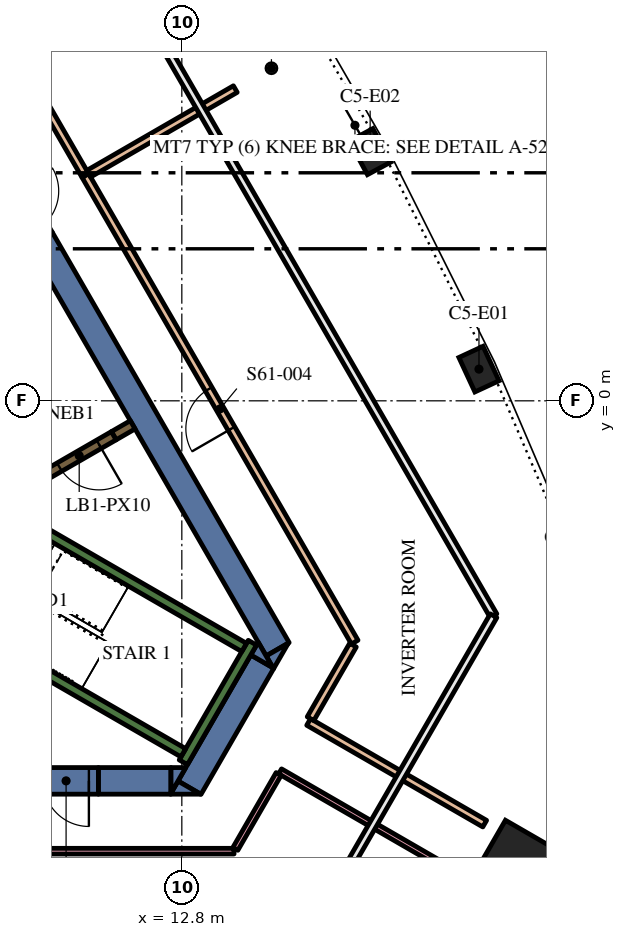
"""IFC4 building model, lengths in metres.
Left out: names, types, materials, properties, quantities, classifications, styles, units other than length and angle.
Written with IfcOpenShell. Run it as: python <this file> out.ifc"""

import sys

from ifc_helpers import new_model, si_unit, direction, frame, frame_2d, origin, origin_2d, place, context, subcontext, project, spatial, polyline, rectangle, outline, extrude, element, fill, save


model = new_model("IFC4")
c1 = context("Model", 3, precision=1e-05, world=origin(), true_north=direction((0.0, 1.0)))
c2 = subcontext(c1, "Body", "Model", "MODEL_VIEW")
j1 = project(units=[si_unit("LENGTHUNIT", "METRE"), si_unit("PLANEANGLEUNIT", "RADIAN")], contexts=[c1])
p1 = place(None, origin())
s1 = spatial("IfcSite", under=j1, at=p1, CompositionType="ELEMENT")
p2 = place(p1, origin())
s2 = spatial("IfcBuilding", under=s1, at=p2, CompositionType="ELEMENT")
p3 = place(p2, frame((0.0, 0.0, 261.6)))
s3 = spatial("IfcBuildingStorey", under=s2, at=p3, CompositionType="ELEMENT", Elevation=261.6)
p4 = place(p3, frame((21.718, -12.539, 0.0), z_axis=(0.0, 0.0, 1.0), x_axis=(0.866025403784, -0.5, 0.0)))
e1 = element("IfcColumn", 1, at=p4, inside=s3, PredefinedType="COLUMN", context=c2, shape_type="SweptSolid", body=[
    extrude(rectangle(XDim=2.2, YDim=2.2, at=origin_2d()), origin(), (0.0, 0.0, 1.0), 5.4),
])
for number, where, z_axis, x_axis in (
    (2, (20.619, 0.834, 0.0), (0.0, 0.0, 1.0), (-0.421, 0.907, 0.0)),
    (3, (17.756, 6.557, 0.0), (0.0, 0.0, 1.0), (-0.474, 0.881, 0.0)),
):
    element("IfcColumn", number, at=place(p3, frame(where, z_axis=z_axis, x_axis=x_axis)), inside=s3, PredefinedType="COLUMN", context=c2, shape_type="SweptSolid", body=[
        extrude(rectangle(XDim=1.0, YDim=0.7, at=origin_2d()), origin(), (0.0, 0.0, 1.0), 5.4),
    ])
p5 = place(p3, frame((9.085, 4.264, 0.0), z_axis=(0.0, 0.0, 1.0), x_axis=(0.499998082512, -0.866026510844, 0.0)))
e4 = element("IfcWall", 4, at=p5, inside=s3, PredefinedType="SOLIDWALL", context=c2, shape_type="SweptSolid", body=[
    extrude(rectangle(XDim=12.472, YDim=0.7, at=frame_2d((6.236, 0.0))), origin(), (0.0, 0.0, 1.0), 5.4),
])
p6 = place(p3, origin())
e5 = element("IfcWall", 5, at=p6, inside=s3, PredefinedType="SOLIDWALL", context=c2, shape_type="SweptSolid", body=[
    extrude(outline(polyline([(15.213, -7.05), (15.019, -6.714), (15.601, -6.378), (15.213, -7.05)])), origin(), (0.0, 0.0, 1.0), 5.4),
])
p7 = place(p3, frame((13.003, -10.179, 0.0), z_axis=(0.0, 0.0, 1.0), x_axis=(0.499972675833, 0.866041178825, 0.0)))
e6 = element("IfcWall", 6, at=p7, inside=s3, PredefinedType="SOLIDWALL", context=c2, shape_type="SweptSolid", body=[
    extrude(rectangle(XDim=3.829, YDim=0.7, at=frame_2d((1.915, 0.0))), origin(), (0.0, 0.0, 1.0), 5.4),
])
e7 = element("IfcWall", 7, at=p6, inside=s3, PredefinedType="SOLIDWALL", context=c2, shape_type="SweptSolid", body=[
    extrude(outline(polyline([(12.698, -10.005), (13.296, -10.35), (12.5, -10.35), (12.698, -10.005)])), origin(), (0.0, 0.0, 1.0), 5.4),
])
e8 = element("IfcWall", 8, at=p6, inside=s3, PredefinedType="SOLIDWALL", context=c2, shape_type="SweptSolid", body=[
    extrude(outline(polyline([(14.809, -6.35), (15.197, -7.022), (14.615, -6.686), (14.809, -6.35)])), origin(), (0.0, 0.0, 1.0), 5.4),
])
p8 = place(p3, frame((10.604, -10.0, 0.0), z_axis=(0.0, 0.0, 1.0), x_axis=(1.0, 0.0, 0.0)))
e9 = element("IfcWall", 9, at=p8, inside=s3, PredefinedType="SOLIDWALL", context=c2, shape_type="SweptSolid", body=[
    extrude(rectangle(XDim=1.909, YDim=0.7, at=frame_2d((0.955, 0.0))), origin(), (0.0, 0.0, 1.0), 5.4),
])
e10 = element("IfcWall", 10, at=p6, inside=s3, PredefinedType="SOLIDWALL", context=c2, shape_type="SweptSolid", body=[
    extrude(outline(polyline([(12.904, -9.65), (12.516, -10.322), (12.516, -9.65), (12.904, -9.65)])), origin(), (0.0, 0.0, 1.0), 5.4),
])
p9 = place(p3, frame((12.84, -9.511, 0.0), z_axis=(0.0, 0.0, 1.0), x_axis=(0.500048121057, 0.865997619297, 0.0)))
e11 = element("IfcWall", 11, at=p9, inside=s3, PredefinedType="SOLIDWALL", context=c2, shape_type="SweptSolid", body=[
    extrude(rectangle(XDim=3.634, YDim=0.25, at=frame_2d((1.817, 0.0))), origin(), (0.0, 0.0, 1.0), 5.4),
])
p10 = place(p3, frame((12.84, -9.261, 0.0), z_axis=(0.0, 0.0, 1.0), x_axis=(-0.866013990052, 0.500019768644, 0.0)))
e12 = element("IfcWall", 12, at=p10, inside=s3, PredefinedType="SOLIDWALL", context=c2, shape_type="SweptSolid", body=[
    extrude(rectangle(XDim=6.8, YDim=0.25, at=frame_2d((3.4, 0.0))), origin(), (0.0, 0.0, 1.0), 5.4),
])
p11 = place(p3, frame((8.334, -2.964, 0.0), z_axis=(0.0, 0.0, 1.0), x_axis=(0.866016039709, -0.500016218704, 0.0)))
e13 = element("IfcWall", 13, at=p11, inside=s3, PredefinedType="SOLIDWALL", context=c2, shape_type="SweptSolid", body=[
    extrude(rectangle(XDim=7.05, YDim=0.25, at=frame_2d((3.525, 0.0))), origin(), (0.0, 0.0, 1.0), 5.4),
])
p12 = place(p3, frame((11.507, -0.631, 0.0), z_axis=(0.0, 0.0, 1.0), x_axis=(-0.866093731455, -0.499881634324, 0.0)))
e14 = element("IfcWall", 14, at=p12, inside=s3, PredefinedType="SOLIDWALL", context=c2, shape_type="SweptSolid", body=[
    extrude(rectangle(XDim=0.575, YDim=0.25, at=frame_2d((0.288, 0.0))), origin(), (0.0, 0.0, 1.0), 5.4),
])
p13 = place(p3, frame((11.009, -0.919, 0.0), z_axis=(0.0, 0.0, 1.0), x_axis=(-0.866059744384, -0.49994051562, 0.0)))
e15 = element("IfcWall", 15, at=p13, inside=s3, PredefinedType="SOLIDWALL", context=c2, shape_type="SweptSolid", body=[
    extrude(rectangle(XDim=2.1, YDim=0.25, at=frame_2d((1.05, 0.0))), origin(), (0.0, 0.0, 1.0), 5.4),
])
p14 = place(p13, frame((0.45, 0.0, 0.0)))
e16 = element("IfcOpeningElement", 16, at=p14, cuts=e15, PredefinedType="OPENING", context=c2, shape_type="SweptSolid", body=[
    extrude(rectangle(XDim=1.2, YDim=2.1, at=frame_2d((0.6, 1.05))), frame((0.0, 0.135, 0.0), z_axis=(0.0, -1.0, 0.0), x_axis=(1.0, 0.0, 0.0)), (0.0, 0.0, 1.0), 0.27),
])
p15 = place(p3, frame((10.604, -10.0, 0.0), z_axis=(0.0, 0.0, 1.0), x_axis=(-1.0, 0.0, 0.0)))
e17 = element("IfcWall", 17, at=p15, inside=s3, PredefinedType="SOLIDWALL", context=c2, shape_type="SweptSolid", body=[
    extrude(rectangle(XDim=1.7, YDim=0.7, at=frame_2d((0.85, 0.0))), origin(), (0.0, 0.0, 1.0), 5.4),
])
p16 = place(p15, frame((0.25, 0.0, 0.0)))
e18 = element("IfcOpeningElement", 18, at=p16, cuts=e17, PredefinedType="OPENING", context=c2, shape_type="SweptSolid", body=[
    extrude(rectangle(XDim=1.2, YDim=2.1, at=frame_2d((0.6, 1.05))), frame((0.0, 0.36, 0.0), z_axis=(0.0, -1.0, 0.0), x_axis=(1.0, 0.0, 0.0)), (0.0, 0.0, 1.0), 0.72),
])
p17 = place(p3, frame((17.349, -6.35, 0.0), z_axis=(0.0, 0.0, 1.0), x_axis=(-0.499997784101, 0.866026683131, 0.0)))
e19 = element("IfcWall", 19, at=p17, inside=s3, PredefinedType="PARTITIONING", context=c2, shape_type="SweptSolid", body=[
    extrude(rectangle(XDim=14.174, YDim=0.2, at=frame_2d((7.087, 0.0))), origin(), (0.0, 0.0, 1.0), 4.75),
])
p18 = place(p17, frame((6.487, 0.0, 0.0)))
e20 = element("IfcOpeningElement", 20, at=p18, cuts=e19, PredefinedType="OPENING", context=c2, shape_type="SweptSolid", body=[
    extrude(rectangle(XDim=1.2, YDim=2.1, at=frame_2d((0.6, 1.05))), frame((0.0, 0.11, 0.0), z_axis=(0.0, -1.0, 0.0), x_axis=(1.0, 0.0, 0.0)), (0.0, 0.0, 1.0), 0.22),
])
p19 = place(p3, frame((-0.0, -11.85, 0.0), z_axis=(0.0, 0.0, 1.0), x_axis=(1.0, 0.0, 0.0)))
e21 = element("IfcWall", 21, at=p19, inside=s3, PredefinedType="PARTITIONING", context=c2, shape_type="SweptSolid", body=[
    extrude(rectangle(XDim=14.174, YDim=0.15, at=frame_2d((7.087, 0.0))), origin(), (0.0, 0.0, 1.0), 4.75),
])
p20 = place(p19, frame((6.637, 0.0, 0.0)))
e22 = element("IfcOpeningElement", 22, at=p20, cuts=e21, PredefinedType="OPENING", context=c2, shape_type="SweptSolid", body=[
    extrude(rectangle(XDim=0.9, YDim=2.1, at=frame_2d((0.45, 1.05))), frame((0.0, 0.085, 0.0), z_axis=(0.0, -1.0, 0.0), x_axis=(1.0, 0.0, 0.0)), (0.0, 0.0, 1.0), 0.17),
])
p21 = place(p3, frame((10.258, 5.934, 0.0), z_axis=(0.0, 0.0, 1.0), x_axis=(-0.500015389047, 0.866016518732, 0.0)))
e23 = element("IfcWall", 23, at=p21, inside=s3, PredefinedType="PARTITIONING", context=c2, shape_type="SweptSolid", body=[
    extrude(rectangle(XDim=14.164, YDim=0.2, at=frame_2d((7.082, 0.0))), origin(), (0.0, 0.0, 1.0), 4.75),
])
p22 = place(p21, frame((6.482, 0.0, 0.0)))
e24 = element("IfcOpeningElement", 24, at=p22, cuts=e23, PredefinedType="OPENING", context=c2, shape_type="SweptSolid", body=[
    extrude(rectangle(XDim=1.2, YDim=2.1, at=frame_2d((0.6, 1.05))), frame((0.0, 0.11, 0.0), z_axis=(0.0, -1.0, 0.0), x_axis=(1.0, 0.0, 0.0)), (0.0, 0.0, 1.0), 0.22),
])
p23 = place(p3, frame((20.02, -12.425, 0.0), z_axis=(0.0, 0.0, 1.0), x_axis=(-0.866024483152, 0.500001594578, 0.0)))
e25 = element("IfcWall", 25, at=p23, inside=s3, PredefinedType="PARTITIONING", context=c2, shape_type="SweptSolid", body=[
    extrude(rectangle(XDim=5.35, YDim=0.15, at=frame_2d((2.675, 0.0))), origin(), (0.0, 0.0, 1.0), 4.75),
])
p24 = place(p3, frame((16.137, -8.45, 0.0), z_axis=(0.0, 0.0, 1.0), x_axis=(0.866024483152, -0.500001594578, 0.0)))
e26 = element("IfcWall", 26, at=p24, inside=s3, PredefinedType="PARTITIONING", context=c2, shape_type="SweptSolid", body=[
    extrude(rectangle(XDim=5.35, YDim=0.2, at=frame_2d((2.675, 0.0))), origin(), (0.0, 0.0, 1.0), 4.75),
])
p25 = place(p3, frame((10.349, 5.975, 0.0), z_axis=(0.0, 0.0, 1.0), x_axis=(0.866022231217, 0.500005495009, 0.0)))
e27 = element("IfcWall", 27, at=p25, inside=s3, PredefinedType="PARTITIONING", context=c2, shape_type="SweptSolid", body=[
    extrude(rectangle(XDim=4.455, YDim=0.2, at=frame_2d((2.228, 0.0))), origin(), (0.0, 0.0, 1.0), 4.75),
])
p26 = place(p3, frame((15.347, -9.819, 0.0), z_axis=(0.0, 0.0, 1.0), x_axis=(-0.50001657589, -0.866015833478, 0.0)))
e28 = element("IfcWall", 28, at=p26, inside=s3, PredefinedType="PARTITIONING", context=c2, shape_type="SweptSolid", body=[
    extrude(rectangle(XDim=2.275, YDim=0.15, at=frame_2d((1.138, 0.0))), origin(), (0.0, 0.0, 1.0), 4.75),
])
p27 = place(p3, frame((17.304, -6.428, 0.0), z_axis=(0.0, 0.0, 1.0), x_axis=(-0.499968249168, -0.86604373436, 0.0)))
e29 = element("IfcWall", 29, at=p27, inside=s3, PredefinedType="PARTITIONING", context=c2, shape_type="SweptSolid", body=[
    extrude(rectangle(XDim=2.236, YDim=0.2, at=frame_2d((1.118, 0.0))), origin(), (0.0, 0.0, 1.0), 4.75),
])
p28 = place(p3, frame((15.158, 8.751, 0.0), z_axis=(0.0, 0.0, 1.0), x_axis=(-0.5, 0.866025403784, 0.0)))
e30 = element("IfcColumn", 30, at=p28, inside=s3, PredefinedType="USERDEFINED", context=c2, shape_type="SweptSolid", body=[
    extrude(rectangle(XDim=0.55, YDim=0.55, at=origin_2d()), origin(), (0.0, 0.0, 1.0), 0.7),
])
p29 = place(p14, origin())
e31 = element("IfcDoor", 31, at=p29, inside=s3, OperationType="SINGLE_SWING_LEFT", PredefinedType="DOOR", context=c2, shape_type="SweptSolid", body=[
    extrude(rectangle(XDim=1.2, YDim=2.1, at=frame_2d((0.6, 1.05))), frame((0.0, 0.025, 0.0), z_axis=(0.0, -1.0, 0.0), x_axis=(1.0, 0.0, 0.0)), (0.0, 0.0, 1.0), 0.05),
])
fill(e16, e31)
p30 = place(p16, origin())
e32 = element("IfcDoor", 32, at=p30, inside=s3, OperationType="SINGLE_SWING_LEFT", PredefinedType="DOOR", context=c2, shape_type="SweptSolid", body=[
    extrude(rectangle(XDim=1.2, YDim=2.1, at=frame_2d((0.6, 1.05))), frame((0.0, 0.025, 0.0), z_axis=(0.0, -1.0, 0.0), x_axis=(1.0, 0.0, 0.0)), (0.0, 0.0, 1.0), 0.05),
])
fill(e18, e32)
p31 = place(p18, origin())
e33 = element("IfcDoor", 33, at=p31, inside=s3, OperationType="SINGLE_SWING_RIGHT", PredefinedType="DOOR", context=c2, shape_type="SweptSolid", body=[
    extrude(rectangle(XDim=1.2, YDim=2.1, at=frame_2d((0.6, 1.05))), frame((0.0, 0.025, 0.0), z_axis=(0.0, -1.0, 0.0), x_axis=(1.0, 0.0, 0.0)), (0.0, 0.0, 1.0), 0.05),
])
fill(e20, e33)
save(model, sys.argv[1])
